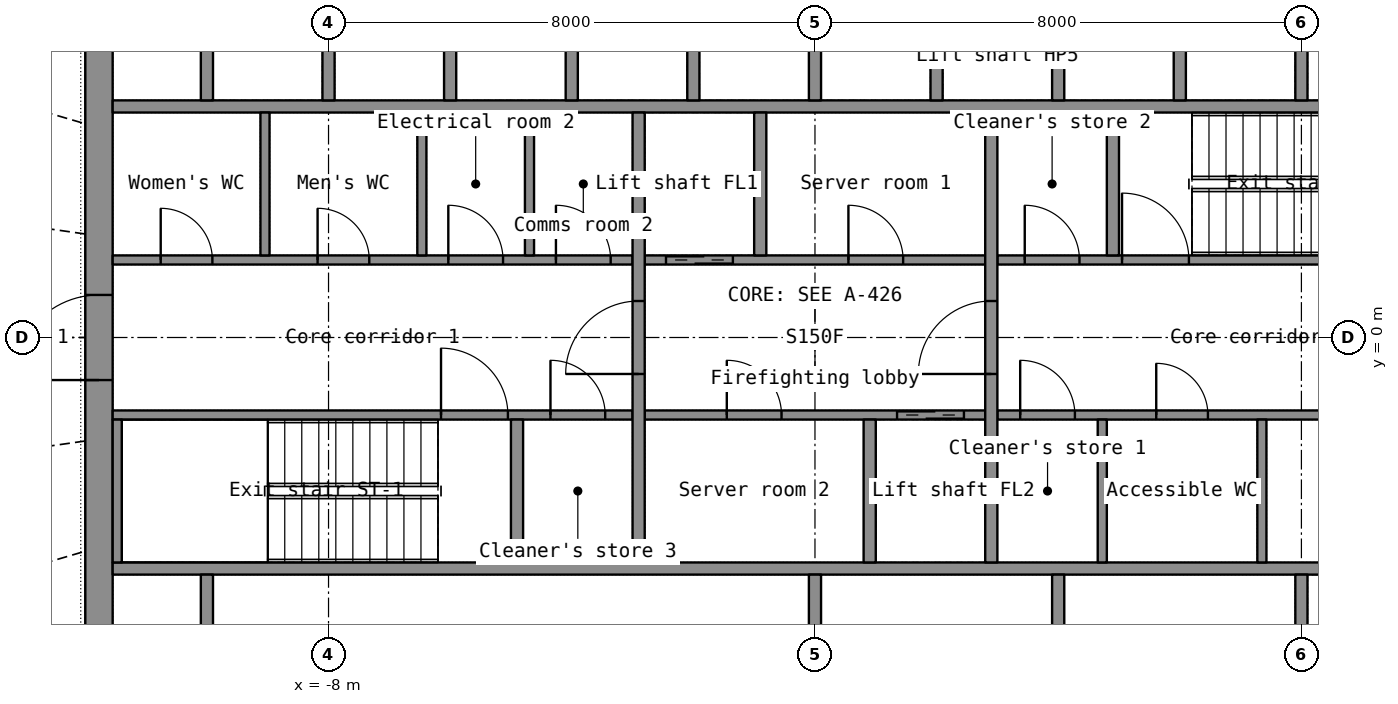
"""IFC4 building model, lengths in metres.
Left out: names, types, materials, properties, quantities, classifications, styles, units other than length and angle.
Written with IfcOpenShell. Run it as: python <this file> out.ifc"""

import sys

from ifc_helpers import new_model, si_unit, direction, frame, frame_2d, origin, place, context, subcontext, project, spatial, rectangle, extrude, element, fill, save


model = new_model("IFC4")
c1 = context("Model", 3, precision=1e-05, world=origin(), true_north=direction((0.0, 1.0)))
c2 = subcontext(c1, "Body", "Model", "MODEL_VIEW")
j1 = project(units=[si_unit("LENGTHUNIT", "METRE"), si_unit("PLANEANGLEUNIT", "RADIAN")], contexts=[c1])
p1 = place(None, origin())
s1 = spatial("IfcSite", under=j1, at=p1, CompositionType="ELEMENT")
p2 = place(p1, origin())
s2 = spatial("IfcBuilding", under=s1, at=p2, CompositionType="ELEMENT")
p3 = place(p2, frame((0.0, 0.0, 201.5)))
s3 = spatial("IfcBuildingStorey", under=s2, at=p3, CompositionType="ELEMENT", Elevation=201.5)
p4 = place(p3, frame((-11.775, -7.2, 0.0), z_axis=(0.0, 0.0, 1.0), x_axis=(0.0, 1.0, 0.0)))
e1 = element("IfcWall", 1, at=p4, inside=s3, PredefinedType="SHEAR", context=c2, shape_type="SweptSolid", body=[
    extrude(rectangle(XDim=14.4, YDim=0.45, at=frame_2d((7.2, 0.0))), origin(), (0.0, 0.0, 1.0), 3.3),
])
p5 = place(p4, frame((6.5, 0.0, 0.0)))
e2 = element("IfcOpeningElement", 2, at=p5, cuts=e1, PredefinedType="OPENING", context=c2, shape_type="SweptSolid", body=[
    extrude(rectangle(XDim=1.4, YDim=2.2, at=frame_2d((0.7, 1.1))), frame((0.0, 0.235, 0.0), z_axis=(0.0, -1.0, 0.0), x_axis=(1.0, 0.0, 0.0)), (0.0, 0.0, 1.0), 0.47),
])
for number, where, z_axis, x_axis in (
    (3, (-11.55, -3.8, 0.0), (0.0, 0.0, 1.0), (1.0, 0.0, 0.0)),
    (4, (-11.55, 3.8, 0.0), (0.0, 0.0, 1.0), (1.0, 0.0, 0.0)),
):
    element("IfcWall", number, at=place(p3, frame(where, z_axis=z_axis, x_axis=x_axis)), inside=s3, PredefinedType="SHEAR", context=c2, shape_type="SweptSolid", body=[
        extrude(rectangle(XDim=23.1, YDim=0.2, at=frame_2d((11.55, 0.0))), origin(), (0.0, 0.0, 1.0), 3.3),
    ])
for number, where, z_axis, x_axis in (
    (5, (-10.0, -6.75, 0.0), (0.0, 0.0, 1.0), (0.0, 1.0, 0.0)),
    (6, (8.0, -6.75, 0.0), (0.0, 0.0, 1.0), (0.0, 1.0, 0.0)),
):
    element("IfcWall", number, at=place(p3, frame(where, z_axis=z_axis, x_axis=x_axis)), inside=s3, PredefinedType="SHEAR", context=c2, shape_type="SweptSolid", body=[
        extrude(rectangle(XDim=2.85, YDim=0.2, at=frame_2d((1.425, 0.0))), origin(), (0.0, 0.0, 1.0), 3.3),
    ])
for number, where, z_axis, x_axis in (
    (7, (0.0, -6.75, 0.0), (0.0, 0.0, 1.0), (0.0, 1.0, 0.0)),
    (8, (4.0, -6.75, 0.0), (0.0, 0.0, 1.0), (0.0, 1.0, 0.0)),
):
    element("IfcWall", number, at=place(p3, frame(where, z_axis=z_axis, x_axis=x_axis)), inside=s3, PredefinedType="PARTITIONING", context=c2, shape_type="SweptSolid", body=[
        extrude(rectangle(XDim=2.85, YDim=0.2, at=frame_2d((1.425, 0.0))), origin(), (0.0, 0.0, 1.0), 3.3),
    ])
for number, where, z_axis, x_axis in (
    (9, (-10.0, 3.9, 0.0), (0.0, 0.0, 1.0), (0.0, 1.0, 0.0)),
    (10, (-8.0, 3.9, 0.0), (0.0, 0.0, 1.0), (0.0, 1.0, 0.0)),
    (11, (-6.0, 3.9, 0.0), (0.0, 0.0, 1.0), (0.0, 1.0, 0.0)),
    (12, (-4.0, 3.9, 0.0), (0.0, 0.0, 1.0), (0.0, 1.0, 0.0)),
    (13, (-2.0, 3.9, 0.0), (0.0, 0.0, 1.0), (0.0, 1.0, 0.0)),
    (14, (0.0, 3.9, 0.0), (0.0, 0.0, 1.0), (0.0, 1.0, 0.0)),
    (15, (2.0, 3.9, 0.0), (0.0, 0.0, 1.0), (0.0, 1.0, 0.0)),
    (16, (4.0, 3.9, 0.0), (0.0, 0.0, 1.0), (0.0, 1.0, 0.0)),
    (17, (6.0, 3.9, 0.0), (0.0, 0.0, 1.0), (0.0, 1.0, 0.0)),
    (18, (8.0, 3.9, 0.0), (0.0, 0.0, 1.0), (0.0, 1.0, 0.0)),
):
    element("IfcWall", number, at=place(p3, frame(where, z_axis=z_axis, x_axis=x_axis)), inside=s3, PredefinedType="SHEAR", context=c2, shape_type="SweptSolid", body=[
        extrude(rectangle(XDim=2.85, YDim=0.2, at=frame_2d((1.425, 0.0))), origin(), (0.0, 0.0, 1.0), 3.3),
    ])
p6 = place(p3, frame((-11.55, -1.275, 0.0), z_axis=(0.0, 0.0, 1.0), x_axis=(1.0, 0.0, 0.0)))
e19 = element("IfcWall", 19, at=p6, inside=s3, PredefinedType="SHEAR", context=c2, shape_type="SweptSolid", body=[
    extrude(rectangle(XDim=8.55, YDim=0.15, at=frame_2d((4.275, 0.0))), origin(), (0.0, 0.0, 1.0), 3.3),
])
p7 = place(p6, frame((5.4, 0.0, 0.0)))
e20 = element("IfcOpeningElement", 20, at=p7, cuts=e19, PredefinedType="OPENING", context=c2, shape_type="SweptSolid", body=[
    extrude(rectangle(XDim=1.1, YDim=2.15, at=frame_2d((0.55, 1.075))), frame((0.0, 0.085, 0.0), z_axis=(0.0, -1.0, 0.0), x_axis=(1.0, 0.0, 0.0)), (0.0, 0.0, 1.0), 0.17),
])
p8 = place(p6, frame((7.2, 0.0, 0.0)))
e21 = element("IfcOpeningElement", 21, at=p8, cuts=e19, PredefinedType="OPENING", context=c2, shape_type="SweptSolid", body=[
    extrude(rectangle(XDim=0.9, YDim=2.1, at=frame_2d((0.45, 1.05))), frame((0.0, 0.085, 0.0), z_axis=(0.0, -1.0, 0.0), x_axis=(1.0, 0.0, 0.0)), (0.0, 0.0, 1.0), 0.17),
])
p9 = place(p3, frame((-2.8, -1.275, 0.0), z_axis=(0.0, 0.0, 1.0), x_axis=(1.0, 0.0, 0.0)))
e22 = element("IfcWall", 22, at=p9, inside=s3, PredefinedType="SHEAR", context=c2, shape_type="SweptSolid", body=[
    extrude(rectangle(XDim=5.6, YDim=0.15, at=frame_2d((2.8, 0.0))), origin(), (0.0, 0.0, 1.0), 3.3),
])
p10 = place(p9, frame((4.15, 0.0, 0.0)))
e23 = element("IfcOpeningElement", 23, at=p10, cuts=e22, PredefinedType="OPENING", context=c2, shape_type="SweptSolid", body=[
    extrude(rectangle(XDim=1.1, YDim=2.2, at=frame_2d((0.55, 1.1))), frame((0.0, 0.085, 0.0), z_axis=(0.0, -1.0, 0.0), x_axis=(1.0, 0.0, 0.0)), (0.0, 0.0, 1.0), 0.17),
])
p11 = place(p9, frame((1.35, 0.0, 0.0)))
e24 = element("IfcOpeningElement", 24, at=p11, cuts=e22, PredefinedType="OPENING", context=c2, shape_type="SweptSolid", body=[
    extrude(rectangle(XDim=0.9, YDim=2.1, at=frame_2d((0.45, 1.05))), frame((0.0, 0.085, 0.0), z_axis=(0.0, -1.0, 0.0), x_axis=(1.0, 0.0, 0.0)), (0.0, 0.0, 1.0), 0.17),
])
p12 = place(p3, frame((3.0, -1.275, 0.0), z_axis=(0.0, 0.0, 1.0), x_axis=(1.0, 0.0, 0.0)))
e25 = element("IfcWall", 25, at=p12, inside=s3, PredefinedType="PARTITIONING", context=c2, shape_type="SweptSolid", body=[
    extrude(rectangle(XDim=8.55, YDim=0.15, at=frame_2d((4.275, 0.0))), origin(), (0.0, 0.0, 1.0), 3.3),
])
p13 = place(p12, frame((0.375, 0.0, 0.0)))
e26 = element("IfcOpeningElement", 26, at=p13, cuts=e25, PredefinedType="OPENING", context=c2, shape_type="SweptSolid", body=[
    extrude(rectangle(XDim=0.9, YDim=2.1, at=frame_2d((0.45, 1.05))), frame((0.0, 0.085, 0.0), z_axis=(0.0, -1.0, 0.0), x_axis=(1.0, 0.0, 0.0)), (0.0, 0.0, 1.0), 0.17),
])
p14 = place(p12, frame((2.613, 0.0, 0.0)))
e27 = element("IfcOpeningElement", 27, at=p14, cuts=e25, PredefinedType="OPENING", context=c2, shape_type="SweptSolid", body=[
    extrude(rectangle(XDim=0.85, YDim=2.1, at=frame_2d((0.425, 1.05))), frame((0.0, 0.085, 0.0), z_axis=(0.0, -1.0, 0.0), x_axis=(1.0, 0.0, 0.0)), (0.0, 0.0, 1.0), 0.17),
])
p15 = place(p12, frame((6.062, 0.0, 0.0)))
e28 = element("IfcOpeningElement", 28, at=p15, cuts=e25, PredefinedType="OPENING", context=c2, shape_type="SweptSolid", body=[
    extrude(rectangle(XDim=0.85, YDim=2.1, at=frame_2d((0.425, 1.05))), frame((0.0, 0.085, 0.0), z_axis=(0.0, -1.0, 0.0), x_axis=(1.0, 0.0, 0.0)), (0.0, 0.0, 1.0), 0.17),
])
p16 = place(p3, frame((-11.55, 1.275, 0.0), z_axis=(0.0, 0.0, 1.0), x_axis=(1.0, 0.0, 0.0)))
e29 = element("IfcWall", 29, at=p16, inside=s3, PredefinedType="PARTITIONING", context=c2, shape_type="SweptSolid", body=[
    extrude(rectangle(XDim=8.55, YDim=0.15, at=frame_2d((4.275, 0.0))), origin(), (0.0, 0.0, 1.0), 3.3),
])
p17 = place(p16, frame((0.79, 0.0, 0.0)))
e30 = element("IfcOpeningElement", 30, at=p17, cuts=e29, PredefinedType="OPENING", context=c2, shape_type="SweptSolid", body=[
    extrude(rectangle(XDim=0.85, YDim=2.1, at=frame_2d((0.425, 1.05))), frame((0.0, 0.085, 0.0), z_axis=(0.0, -1.0, 0.0), x_axis=(1.0, 0.0, 0.0)), (0.0, 0.0, 1.0), 0.17),
])
p18 = place(p16, frame((3.37, 0.0, 0.0)))
e31 = element("IfcOpeningElement", 31, at=p18, cuts=e29, PredefinedType="OPENING", context=c2, shape_type="SweptSolid", body=[
    extrude(rectangle(XDim=0.85, YDim=2.1, at=frame_2d((0.425, 1.05))), frame((0.0, 0.085, 0.0), z_axis=(0.0, -1.0, 0.0), x_axis=(1.0, 0.0, 0.0)), (0.0, 0.0, 1.0), 0.17),
])
p19 = place(p16, frame((5.52, 0.0, 0.0)))
e32 = element("IfcOpeningElement", 32, at=p19, cuts=e29, PredefinedType="OPENING", context=c2, shape_type="SweptSolid", body=[
    extrude(rectangle(XDim=0.9, YDim=2.1, at=frame_2d((0.45, 1.05))), frame((0.0, 0.085, 0.0), z_axis=(0.0, -1.0, 0.0), x_axis=(1.0, 0.0, 0.0)), (0.0, 0.0, 1.0), 0.17),
])
p20 = place(p16, frame((7.29, 0.0, 0.0)))
e33 = element("IfcOpeningElement", 33, at=p20, cuts=e29, PredefinedType="OPENING", context=c2, shape_type="SweptSolid", body=[
    extrude(rectangle(XDim=0.9, YDim=2.1, at=frame_2d((0.45, 1.05))), frame((0.0, 0.085, 0.0), z_axis=(0.0, -1.0, 0.0), x_axis=(1.0, 0.0, 0.0)), (0.0, 0.0, 1.0), 0.17),
])
p21 = place(p3, frame((-2.8, 1.275, 0.0), z_axis=(0.0, 0.0, 1.0), x_axis=(1.0, 0.0, 0.0)))
e34 = element("IfcWall", 34, at=p21, inside=s3, PredefinedType="SHEAR", context=c2, shape_type="SweptSolid", body=[
    extrude(rectangle(XDim=5.6, YDim=0.15, at=frame_2d((2.8, 0.0))), origin(), (0.0, 0.0, 1.0), 3.3),
])
p22 = place(p21, frame((0.35, 0.0, 0.0)))
e35 = element("IfcOpeningElement", 35, at=p22, cuts=e34, PredefinedType="OPENING", context=c2, shape_type="SweptSolid", body=[
    extrude(rectangle(XDim=1.1, YDim=2.2, at=frame_2d((0.55, 1.1))), frame((0.0, 0.085, 0.0), z_axis=(0.0, -1.0, 0.0), x_axis=(1.0, 0.0, 0.0)), (0.0, 0.0, 1.0), 0.17),
])
p23 = place(p21, frame((3.35, 0.0, 0.0)))
e36 = element("IfcOpeningElement", 36, at=p23, cuts=e34, PredefinedType="OPENING", context=c2, shape_type="SweptSolid", body=[
    extrude(rectangle(XDim=0.9, YDim=2.1, at=frame_2d((0.45, 1.05))), frame((0.0, 0.085, 0.0), z_axis=(0.0, -1.0, 0.0), x_axis=(1.0, 0.0, 0.0)), (0.0, 0.0, 1.0), 0.17),
])
p24 = place(p3, frame((3.0, 1.275, 0.0), z_axis=(0.0, 0.0, 1.0), x_axis=(1.0, 0.0, 0.0)))
e37 = element("IfcWall", 37, at=p24, inside=s3, PredefinedType="SHEAR", context=c2, shape_type="SweptSolid", body=[
    extrude(rectangle(XDim=8.55, YDim=0.15, at=frame_2d((4.275, 0.0))), origin(), (0.0, 0.0, 1.0), 3.3),
])
p25 = place(p24, frame((2.05, 0.0, 0.0)))
e38 = element("IfcOpeningElement", 38, at=p25, cuts=e37, PredefinedType="OPENING", context=c2, shape_type="SweptSolid", body=[
    extrude(rectangle(XDim=1.1, YDim=2.15, at=frame_2d((0.55, 1.075))), frame((0.0, 0.085, 0.0), z_axis=(0.0, -1.0, 0.0), x_axis=(1.0, 0.0, 0.0)), (0.0, 0.0, 1.0), 0.17),
])
p26 = place(p24, frame((0.45, 0.0, 0.0)))
e39 = element("IfcOpeningElement", 39, at=p26, cuts=e37, PredefinedType="OPENING", context=c2, shape_type="SweptSolid", body=[
    extrude(rectangle(XDim=0.9, YDim=2.1, at=frame_2d((0.45, 1.05))), frame((0.0, 0.085, 0.0), z_axis=(0.0, -1.0, 0.0), x_axis=(1.0, 0.0, 0.0)), (0.0, 0.0, 1.0), 0.17),
])
p27 = place(p3, frame((-2.9, -3.7, 0.0), z_axis=(0.0, 0.0, 1.0), x_axis=(0.0, 1.0, 0.0)))
e40 = element("IfcWall", 40, at=p27, inside=s3, PredefinedType="SHEAR", context=c2, shape_type="SweptSolid", body=[
    extrude(rectangle(XDim=7.4, YDim=0.2, at=frame_2d((3.7, 0.0))), origin(), (0.0, 0.0, 1.0), 3.3),
])
p28 = place(p27, frame((3.1, 0.0, 0.0)))
e41 = element("IfcOpeningElement", 41, at=p28, cuts=e40, PredefinedType="OPENING", context=c2, shape_type="SweptSolid", body=[
    extrude(rectangle(XDim=1.2, YDim=2.2, at=frame_2d((0.6, 1.1))), frame((0.0, 0.11, 0.0), z_axis=(0.0, -1.0, 0.0), x_axis=(1.0, 0.0, 0.0)), (0.0, 0.0, 1.0), 0.22),
])
p29 = place(p3, frame((2.9, -3.7, 0.0), z_axis=(0.0, 0.0, 1.0), x_axis=(0.0, 1.0, 0.0)))
e42 = element("IfcWall", 42, at=p29, inside=s3, PredefinedType="SHEAR", context=c2, shape_type="SweptSolid", body=[
    extrude(rectangle(XDim=7.4, YDim=0.2, at=frame_2d((3.7, 0.0))), origin(), (0.0, 0.0, 1.0), 3.3),
])
p30 = place(p29, frame((3.1, 0.0, 0.0)))
e43 = element("IfcOpeningElement", 43, at=p30, cuts=e42, PredefinedType="OPENING", context=c2, shape_type="SweptSolid", body=[
    extrude(rectangle(XDim=1.2, YDim=2.2, at=frame_2d((0.6, 1.1))), frame((0.0, 0.11, 0.0), z_axis=(0.0, -1.0, 0.0), x_axis=(1.0, 0.0, 0.0)), (0.0, 0.0, 1.0), 0.22),
])
for number, where, z_axis, x_axis in (
    (44, (-0.9, 1.35, 0.0), (0.0, 0.0, 1.0), (0.0, 1.0, 0.0)),
    (45, (0.9, -3.7, 0.0), (0.0, 0.0, 1.0), (0.0, 1.0, 0.0)),
):
    element("IfcWall", number, at=place(p3, frame(where, z_axis=z_axis, x_axis=x_axis)), inside=s3, PredefinedType="SHEAR", context=c2, shape_type="SweptSolid", body=[
        extrude(rectangle(XDim=2.35, YDim=0.2, at=frame_2d((1.175, 0.0))), origin(), (0.0, 0.0, 1.0), 3.3),
    ])
p31 = place(p3, frame((-11.475, -3.7, 0.0), z_axis=(0.0, 0.0, 1.0), x_axis=(0.0, 1.0, 0.0)))
e46 = element("IfcWall", 46, at=p31, inside=s3, PredefinedType="SHEAR", context=c2, shape_type="SweptSolid", body=[
    extrude(rectangle(XDim=2.35, YDim=0.15, at=frame_2d((1.175, 0.0))), origin(), (0.0, 0.0, 1.0), 3.3),
])
for number, where, z_axis, x_axis in (
    (47, (-4.9, -3.7, 0.0), (0.0, 0.0, 1.0), (0.0, 1.0, 0.0)),
    (48, (4.9, 1.35, 0.0), (0.0, 0.0, 1.0), (0.0, 1.0, 0.0)),
):
    element("IfcWall", number, at=place(p3, frame(where, z_axis=z_axis, x_axis=x_axis)), inside=s3, PredefinedType="SHEAR", context=c2, shape_type="SweptSolid", body=[
        extrude(rectangle(XDim=2.35, YDim=0.2, at=frame_2d((1.175, 0.0))), origin(), (0.0, 0.0, 1.0), 3.3),
    ])
for number, where, z_axis, x_axis in (
    (49, (-9.045, 1.35, 0.0), (0.0, 0.0, 1.0), (0.0, 1.0, 0.0)),
    (50, (-6.465, 1.35, 0.0), (0.0, 0.0, 1.0), (0.0, 1.0, 0.0)),
    (51, (-4.695, 1.35, 0.0), (0.0, 0.0, 1.0), (0.0, 1.0, 0.0)),
    (52, (4.725, -3.7, 0.0), (0.0, 0.0, 1.0), (0.0, 1.0, 0.0)),
    (53, (7.35, -3.7, 0.0), (0.0, 0.0, 1.0), (0.0, 1.0, 0.0)),
):
    element("IfcWall", number, at=place(p3, frame(where, z_axis=z_axis, x_axis=x_axis)), inside=s3, PredefinedType="PARTITIONING", context=c2, shape_type="SweptSolid", body=[
        extrude(rectangle(XDim=2.35, YDim=0.15, at=frame_2d((1.175, 0.0))), origin(), (0.0, 0.0, 1.0), 3.3),
    ])
p32 = place(p5, origin())
e54 = element("IfcDoor", 54, at=p32, inside=s3, OperationType="DOUBLE_DOOR_SINGLE_SWING", PredefinedType="DOOR", context=c2, shape_type="SweptSolid", body=[
    extrude(rectangle(XDim=1.4, YDim=2.2, at=frame_2d((0.7, 1.1))), frame((0.0, 0.025, 0.0), z_axis=(0.0, -1.0, 0.0), x_axis=(1.0, 0.0, 0.0)), (0.0, 0.0, 1.0), 0.05),
])
fill(e2, e54)
p33 = place(p28, origin())
e55 = element("IfcDoor", 55, at=p33, inside=s3, OperationType="SINGLE_SWING_LEFT", PredefinedType="DOOR", context=c2, shape_type="SweptSolid", body=[
    extrude(rectangle(XDim=1.2, YDim=2.2, at=frame_2d((0.6, 1.1))), frame((0.0, 0.025, 0.0), z_axis=(0.0, -1.0, 0.0), x_axis=(1.0, 0.0, 0.0)), (0.0, 0.0, 1.0), 0.05),
])
fill(e41, e55)
p34 = place(p30, origin())
e56 = element("IfcDoor", 56, at=p34, inside=s3, OperationType="SINGLE_SWING_LEFT", PredefinedType="DOOR", context=c2, shape_type="SweptSolid", body=[
    extrude(rectangle(XDim=1.2, YDim=2.2, at=frame_2d((0.6, 1.1))), frame((0.0, 0.025, 0.0), z_axis=(0.0, -1.0, 0.0), x_axis=(1.0, 0.0, 0.0)), (0.0, 0.0, 1.0), 0.05),
])
fill(e43, e56)
p35 = place(p22, origin())
e57 = element("IfcDoor", 57, at=p35, inside=s3, OperationType="DOUBLE_DOOR_SLIDING", PredefinedType="DOOR", context=c2, shape_type="SweptSolid", body=[
    extrude(rectangle(XDim=1.1, YDim=2.2, at=frame_2d((0.55, 1.1))), frame((0.0, 0.025, 0.0), z_axis=(0.0, -1.0, 0.0), x_axis=(1.0, 0.0, 0.0)), (0.0, 0.0, 1.0), 0.05),
])
fill(e35, e57)
p36 = place(p10, origin())
e58 = element("IfcDoor", 58, at=p36, inside=s3, OperationType="DOUBLE_DOOR_SLIDING", PredefinedType="DOOR", context=c2, shape_type="SweptSolid", body=[
    extrude(rectangle(XDim=1.1, YDim=2.2, at=frame_2d((0.55, 1.1))), frame((0.0, 0.025, 0.0), z_axis=(0.0, -1.0, 0.0), x_axis=(1.0, 0.0, 0.0)), (0.0, 0.0, 1.0), 0.05),
])
fill(e23, e58)
p37 = place(p7, origin())
e59 = element("IfcDoor", 59, at=p37, inside=s3, OperationType="SINGLE_SWING_LEFT", PredefinedType="DOOR", context=c2, shape_type="SweptSolid", body=[
    extrude(rectangle(XDim=1.1, YDim=2.15, at=frame_2d((0.55, 1.075))), frame((0.0, 0.025, 0.0), z_axis=(0.0, -1.0, 0.0), x_axis=(1.0, 0.0, 0.0)), (0.0, 0.0, 1.0), 0.05),
])
fill(e20, e59)
p38 = place(p25, origin())
e60 = element("IfcDoor", 60, at=p38, inside=s3, OperationType="SINGLE_SWING_LEFT", PredefinedType="DOOR", context=c2, shape_type="SweptSolid", body=[
    extrude(rectangle(XDim=1.1, YDim=2.15, at=frame_2d((0.55, 1.075))), frame((0.0, 0.025, 0.0), z_axis=(0.0, -1.0, 0.0), x_axis=(1.0, 0.0, 0.0)), (0.0, 0.0, 1.0), 0.05),
])
fill(e38, e60)
p39 = place(p17, origin())
e61 = element("IfcDoor", 61, at=p39, inside=s3, OperationType="SINGLE_SWING_LEFT", PredefinedType="DOOR", context=c2, shape_type="SweptSolid", body=[
    extrude(rectangle(XDim=0.85, YDim=2.1, at=frame_2d((0.425, 1.05))), frame((0.0, 0.025, 0.0), z_axis=(0.0, -1.0, 0.0), x_axis=(1.0, 0.0, 0.0)), (0.0, 0.0, 1.0), 0.05),
])
fill(e30, e61)
p40 = place(p18, origin())
e62 = element("IfcDoor", 62, at=p40, inside=s3, OperationType="SINGLE_SWING_LEFT", PredefinedType="DOOR", context=c2, shape_type="SweptSolid", body=[
    extrude(rectangle(XDim=0.85, YDim=2.1, at=frame_2d((0.425, 1.05))), frame((0.0, 0.025, 0.0), z_axis=(0.0, -1.0, 0.0), x_axis=(1.0, 0.0, 0.0)), (0.0, 0.0, 1.0), 0.05),
])
fill(e31, e62)
p41 = place(p19, origin())
e63 = element("IfcDoor", 63, at=p41, inside=s3, OperationType="SINGLE_SWING_LEFT", PredefinedType="DOOR", context=c2, shape_type="SweptSolid", body=[
    extrude(rectangle(XDim=0.9, YDim=2.1, at=frame_2d((0.45, 1.05))), frame((0.0, 0.025, 0.0), z_axis=(0.0, -1.0, 0.0), x_axis=(1.0, 0.0, 0.0)), (0.0, 0.0, 1.0), 0.05),
])
fill(e32, e63)
p42 = place(p20, origin())
e64 = element("IfcDoor", 64, at=p42, inside=s3, OperationType="SINGLE_SWING_LEFT", PredefinedType="DOOR", context=c2, shape_type="SweptSolid", body=[
    extrude(rectangle(XDim=0.9, YDim=2.1, at=frame_2d((0.45, 1.05))), frame((0.0, 0.025, 0.0), z_axis=(0.0, -1.0, 0.0), x_axis=(1.0, 0.0, 0.0)), (0.0, 0.0, 1.0), 0.05),
])
fill(e33, e64)
p43 = place(p13, origin())
e65 = element("IfcDoor", 65, at=p43, inside=s3, OperationType="SINGLE_SWING_LEFT", PredefinedType="DOOR", context=c2, shape_type="SweptSolid", body=[
    extrude(rectangle(XDim=0.9, YDim=2.1, at=frame_2d((0.45, 1.05))), frame((0.0, 0.025, 0.0), z_axis=(0.0, -1.0, 0.0), x_axis=(1.0, 0.0, 0.0)), (0.0, 0.0, 1.0), 0.05),
])
fill(e26, e65)
p44 = place(p14, origin())
e66 = element("IfcDoor", 66, at=p44, inside=s3, OperationType="SINGLE_SWING_LEFT", PredefinedType="DOOR", context=c2, shape_type="SweptSolid", body=[
    extrude(rectangle(XDim=0.85, YDim=2.1, at=frame_2d((0.425, 1.05))), frame((0.0, 0.025, 0.0), z_axis=(0.0, -1.0, 0.0), x_axis=(1.0, 0.0, 0.0)), (0.0, 0.0, 1.0), 0.05),
])
fill(e27, e66)
p45 = place(p23, origin())
e67 = element("IfcDoor", 67, at=p45, inside=s3, OperationType="SINGLE_SWING_LEFT", PredefinedType="DOOR", context=c2, shape_type="SweptSolid", body=[
    extrude(rectangle(XDim=0.9, YDim=2.1, at=frame_2d((0.45, 1.05))), frame((0.0, 0.025, 0.0), z_axis=(0.0, -1.0, 0.0), x_axis=(1.0, 0.0, 0.0)), (0.0, 0.0, 1.0), 0.05),
])
fill(e36, e67)
p46 = place(p11, origin())
e68 = element("IfcDoor", 68, at=p46, inside=s3, OperationType="SINGLE_SWING_LEFT", PredefinedType="DOOR", context=c2, shape_type="SweptSolid", body=[
    extrude(rectangle(XDim=0.9, YDim=2.1, at=frame_2d((0.45, 1.05))), frame((0.0, 0.025, 0.0), z_axis=(0.0, -1.0, 0.0), x_axis=(1.0, 0.0, 0.0)), (0.0, 0.0, 1.0), 0.05),
])
fill(e24, e68)
p47 = place(p26, origin())
e69 = element("IfcDoor", 69, at=p47, inside=s3, OperationType="SINGLE_SWING_LEFT", PredefinedType="DOOR", context=c2, shape_type="SweptSolid", body=[
    extrude(rectangle(XDim=0.9, YDim=2.1, at=frame_2d((0.45, 1.05))), frame((0.0, 0.025, 0.0), z_axis=(0.0, -1.0, 0.0), x_axis=(1.0, 0.0, 0.0)), (0.0, 0.0, 1.0), 0.05),
])
fill(e39, e69)
p48 = place(p8, origin())
e70 = element("IfcDoor", 70, at=p48, inside=s3, OperationType="SINGLE_SWING_LEFT", PredefinedType="DOOR", context=c2, shape_type="SweptSolid", body=[
    extrude(rectangle(XDim=0.9, YDim=2.1, at=frame_2d((0.45, 1.05))), frame((0.0, 0.025, 0.0), z_axis=(0.0, -1.0, 0.0), x_axis=(1.0, 0.0, 0.0)), (0.0, 0.0, 1.0), 0.05),
])
fill(e21, e70)
save(model, sys.argv[1])
